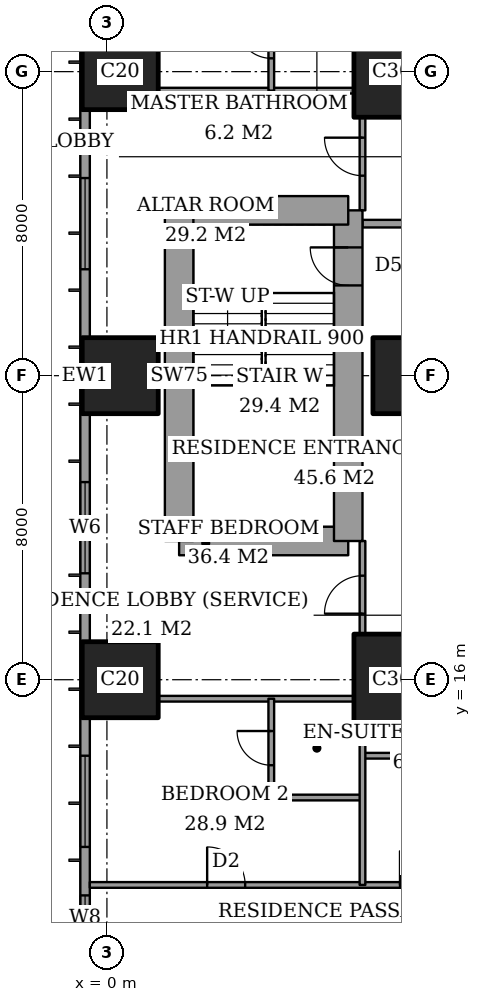
"""IFC4 building model, lengths in metres.
Left out: names, types, materials, properties, quantities, classifications, styles, units other than length and angle.
Written with IfcOpenShell. Run it as: python <this file> out.ifc"""

import sys

from ifc_helpers import new_model, si_unit, direction, frame, frame_2d, origin, origin_2d, place, context, subcontext, project, spatial, rectangle, extrude, element, fill, save


model = new_model("IFC4")
c1 = context("Model", 3, precision=1e-05, world=origin(), true_north=direction((0.0, 1.0)))
c2 = subcontext(c1, "Body", "Model", "MODEL_VIEW")
j1 = project(units=[si_unit("LENGTHUNIT", "METRE"), si_unit("PLANEANGLEUNIT", "RADIAN")], contexts=[c1])
p1 = place(None, origin())
s1 = spatial("IfcSite", under=j1, at=p1, CompositionType="ELEMENT")
p2 = place(p1, origin())
s2 = spatial("IfcBuilding", under=s1, at=p2, CompositionType="ELEMENT")
p3 = place(p2, frame((0.0, 0.0, 62.0)))
s3 = spatial("IfcBuildingStorey", under=s2, at=p3, CompositionType="ELEMENT", Elevation=62.0)
for number, where, z_axis, x_axis in (
    (1, (0.35, 16.0, 0.0), (0.0, 0.0, 1.0), (1.0, 0.0, 0.0)),
    (2, (0.35, 24.0, 0.0), (0.0, 0.0, 1.0), (1.0, 0.0, 0.0)),
    (3, (0.35, 32.0, 0.0), (0.0, 0.0, 1.0), (1.0, 0.0, 0.0)),
):
    element("IfcColumn", number, at=place(p3, frame(where, z_axis=z_axis, x_axis=x_axis)), inside=s3, PredefinedType="COLUMN", context=c2, shape_type="SweptSolid", body=[
        extrude(rectangle(XDim=2.0, YDim=2.0, at=origin_2d()), origin(), (0.0, 0.0, 1.0), 3.6),
    ])
p4 = place(p3, frame((8.0, 16.0, 0.0), z_axis=(0.0, 0.0, 1.0), x_axis=(1.0, 0.0, 0.0)))
e4 = element("IfcColumn", 4, at=p4, inside=s3, PredefinedType="COLUMN", context=c2, shape_type="SweptSolid", body=[
    extrude(rectangle(XDim=3.0, YDim=2.4, at=origin_2d()), origin(), (0.0, 0.0, 1.0), 3.6),
])
p5 = place(p3, frame((8.0, 24.0, 0.0), z_axis=(0.0, 0.0, 1.0), x_axis=(1.0, 0.0, 0.0)))
e5 = element("IfcColumn", 5, at=p5, inside=s3, PredefinedType="COLUMN", context=c2, shape_type="SweptSolid", body=[
    extrude(rectangle(XDim=2.0, YDim=2.0, at=origin_2d()), origin(), (0.0, 0.0, 1.0), 3.6),
])
p6 = place(p3, frame((8.0, 32.0, 0.0), z_axis=(0.0, 0.0, 1.0), x_axis=(1.0, 0.0, 0.0)))
e6 = element("IfcColumn", 6, at=p6, inside=s3, PredefinedType="COLUMN", context=c2, shape_type="SweptSolid", body=[
    extrude(rectangle(XDim=3.0, YDim=2.4, at=origin_2d()), origin(), (0.0, 0.0, 1.0), 3.6),
])
p7 = place(p3, frame((1.9, 19.65, 0.0), z_axis=(0.0, 0.0, 1.0), x_axis=(1.0, 0.0, 0.0)))
e7 = element("IfcWall", 7, at=p7, inside=s3, PredefinedType="SHEAR", context=c2, shape_type="SweptSolid", body=[
    extrude(rectangle(XDim=4.45, YDim=0.75, at=frame_2d((2.225, 0.0))), origin(), (0.0, 0.0, 1.0), 3.6),
])
p8 = place(p3, frame((6.35, 19.65, 0.0), z_axis=(0.0, 0.0, 1.0), x_axis=(0.0, 1.0, 0.0)))
e8 = element("IfcWall", 8, at=p8, inside=s3, PredefinedType="SHEAR", context=c2, shape_type="SweptSolid", body=[
    extrude(rectangle(XDim=8.7, YDim=0.75, at=frame_2d((4.35, 0.0))), origin(), (0.0, 0.0, 1.0), 3.6),
])
p9 = place(p8, frame((6.725, 0.0, 0.0)))
e9 = element("IfcOpeningElement", 9, at=p9, cuts=e8, PredefinedType="OPENING", context=c2, shape_type="SweptSolid", body=[
    extrude(rectangle(XDim=1.0, YDim=2.1, at=frame_2d((0.5, 1.05))), frame((0.0, 0.385, 0.0), z_axis=(0.0, -1.0, 0.0), x_axis=(1.0, 0.0, 0.0)), (0.0, 0.0, 1.0), 0.77),
])
p10 = place(p3, frame((6.35, 28.35, 0.0), z_axis=(0.0, 0.0, 1.0), x_axis=(-1.0, 0.0, 0.0)))
e10 = element("IfcWall", 10, at=p10, inside=s3, PredefinedType="SHEAR", context=c2, shape_type="SweptSolid", body=[
    extrude(rectangle(XDim=4.45, YDim=0.75, at=frame_2d((2.225, 0.0))), origin(), (0.0, 0.0, 1.0), 3.6),
])
p11 = place(p3, frame((1.9, 28.35, 0.0), z_axis=(0.0, 0.0, 1.0), x_axis=(0.0, -1.0, 0.0)))
e11 = element("IfcWall", 11, at=p11, inside=s3, PredefinedType="SHEAR", context=c2, shape_type="SweptSolid", body=[
    extrude(rectangle(XDim=8.7, YDim=0.75, at=frame_2d((4.35, 0.0))), origin(), (0.0, 0.0, 1.0), 3.6),
])
p12 = place(p3, frame((-0.575, 44.825, 0.0), z_axis=(0.0, 0.0, 1.0), x_axis=(0.0, -1.0, 0.0)))
e12 = element("IfcWall", 12, at=p12, inside=s3, PredefinedType="SOLIDWALL", context=c2, shape_type="SweptSolid", body=[
    extrude(rectangle(XDim=41.65, YDim=0.25, at=frame_2d((20.825, 0.0))), origin(), (0.0, 0.0, 1.0), 3.6),
])
p13 = place(p12, frame((0.775, 0.0, 0.6)))
e13 = element("IfcOpeningElement", 13, at=p13, cuts=e12, PredefinedType="OPENING", context=c2, shape_type="SweptSolid", body=[
    extrude(rectangle(XDim=2.4, YDim=2.0, at=frame_2d((1.2, 1.0))), frame((0.0, 0.135, 0.0), z_axis=(0.0, -1.0, 0.0), x_axis=(1.0, 0.0, 0.0)), (0.0, 0.0, 1.0), 0.27),
])
p14 = place(p12, frame((6.1, 0.0, 0.6)))
e14 = element("IfcOpeningElement", 14, at=p14, cuts=e12, PredefinedType="OPENING", context=c2, shape_type="SweptSolid", body=[
    extrude(rectangle(XDim=1.2, YDim=2.0, at=frame_2d((0.6, 1.0))), frame((0.0, 0.135, 0.0), z_axis=(0.0, -1.0, 0.0), x_axis=(1.0, 0.0, 0.0)), (0.0, 0.0, 1.0), 0.27),
])
p15 = place(p12, frame((8.425, 0.0, 0.6)))
e15 = element("IfcOpeningElement", 15, at=p15, cuts=e12, PredefinedType="OPENING", context=c2, shape_type="SweptSolid", body=[
    extrude(rectangle(XDim=2.4, YDim=2.0, at=frame_2d((1.2, 1.0))), frame((0.0, 0.135, 0.0), z_axis=(0.0, -1.0, 0.0), x_axis=(1.0, 0.0, 0.0)), (0.0, 0.0, 1.0), 0.27),
])
p16 = place(p12, frame((15.625, 0.0, 0.6)))
e16 = element("IfcOpeningElement", 16, at=p16, cuts=e12, PredefinedType="OPENING", context=c2, shape_type="SweptSolid", body=[
    extrude(rectangle(XDim=2.4, YDim=2.0, at=frame_2d((1.2, 1.0))), frame((0.0, 0.135, 0.0), z_axis=(0.0, -1.0, 0.0), x_axis=(1.0, 0.0, 0.0)), (0.0, 0.0, 1.0), 0.27),
])
p17 = place(p12, frame((23.625, 0.0, 0.6)))
e17 = element("IfcOpeningElement", 17, at=p17, cuts=e12, PredefinedType="OPENING", context=c2, shape_type="SweptSolid", body=[
    extrude(rectangle(XDim=2.4, YDim=2.0, at=frame_2d((1.2, 1.0))), frame((0.0, 0.135, 0.0), z_axis=(0.0, -1.0, 0.0), x_axis=(1.0, 0.0, 0.0)), (0.0, 0.0, 1.0), 0.27),
])
p18 = place(p12, frame((30.825, 0.0, 0.6)))
e18 = element("IfcOpeningElement", 18, at=p18, cuts=e12, PredefinedType="OPENING", context=c2, shape_type="SweptSolid", body=[
    extrude(rectangle(XDim=2.4, YDim=2.0, at=frame_2d((1.2, 1.0))), frame((0.0, 0.135, 0.0), z_axis=(0.0, -1.0, 0.0), x_axis=(1.0, 0.0, 0.0)), (0.0, 0.0, 1.0), 0.27),
])
p19 = place(p12, frame((34.5, 0.0, 0.6)))
e19 = element("IfcOpeningElement", 19, at=p19, cuts=e12, PredefinedType="OPENING", context=c2, shape_type="SweptSolid", body=[
    extrude(rectangle(XDim=1.2, YDim=2.0, at=frame_2d((0.6, 1.0))), frame((0.0, 0.135, 0.0), z_axis=(0.0, -1.0, 0.0), x_axis=(1.0, 0.0, 0.0)), (0.0, 0.0, 1.0), 0.27),
])
p20 = place(p12, frame((38.475, 0.0, 0.6)))
e20 = element("IfcOpeningElement", 20, at=p20, cuts=e12, PredefinedType="OPENING", context=c2, shape_type="SweptSolid", body=[
    extrude(rectangle(XDim=2.4, YDim=2.0, at=frame_2d((1.2, 1.0))), frame((0.0, 0.135, 0.0), z_axis=(0.0, -1.0, 0.0), x_axis=(1.0, 0.0, 0.0)), (0.0, 0.0, 1.0), 0.27),
])
p21 = place(p3, frame((-0.45, 10.6, 0.0), z_axis=(0.0, 0.0, 1.0), x_axis=(1.0, 0.0, 0.0)))
e21 = element("IfcWall", 21, at=p21, inside=s3, PredefinedType="PARTITIONING", context=c2, shape_type="SweptSolid", body=[
    extrude(rectangle(XDim=25.011, YDim=0.15, at=frame_2d((12.505, 0.0))), origin(), (0.0, 0.0, 1.0), 3.35),
])
p22 = place(p21, frame((10.65, 0.0, 0.0)))
e22 = element("IfcOpeningElement", 22, at=p22, cuts=e21, PredefinedType="OPENING", context=c2, shape_type="SweptSolid", body=[
    extrude(rectangle(XDim=1.0, YDim=2.1, at=frame_2d((0.5, 1.05))), frame((0.0, 0.085, 0.0), z_axis=(0.0, -1.0, 0.0), x_axis=(1.0, 0.0, 0.0)), (0.0, 0.0, 1.0), 0.17),
])
p23 = place(p21, frame((3.087, 0.0, 0.0)))
e23 = element("IfcOpeningElement", 23, at=p23, cuts=e21, PredefinedType="OPENING", context=c2, shape_type="SweptSolid", body=[
    extrude(rectangle(XDim=1.0, YDim=2.1, at=frame_2d((0.5, 1.05))), frame((0.0, 0.085, 0.0), z_axis=(0.0, -1.0, 0.0), x_axis=(1.0, 0.0, 0.0)), (0.0, 0.0, 1.0), 0.17),
])
p24 = place(p21, frame((8.163, 0.0, 0.0)))
e24 = element("IfcOpeningElement", 24, at=p24, cuts=e21, PredefinedType="OPENING", context=c2, shape_type="SweptSolid", body=[
    extrude(rectangle(XDim=0.9, YDim=2.1, at=frame_2d((0.45, 1.05))), frame((0.0, 0.085, 0.0), z_axis=(0.0, -1.0, 0.0), x_axis=(1.0, 0.0, 0.0)), (0.0, 0.0, 1.0), 0.17),
])
p25 = place(p21, frame((13.35, 0.0, 0.0)))
e25 = element("IfcOpeningElement", 25, at=p25, cuts=e21, PredefinedType="OPENING", context=c2, shape_type="SweptSolid", body=[
    extrude(rectangle(XDim=1.0, YDim=2.1, at=frame_2d((0.5, 1.05))), frame((0.0, 0.085, 0.0), z_axis=(0.0, -1.0, 0.0), x_axis=(1.0, 0.0, 0.0)), (0.0, 0.0, 1.0), 0.17),
])
p26 = place(p21, frame((16.45, 0.0, 0.0)))
e26 = element("IfcOpeningElement", 26, at=p26, cuts=e21, PredefinedType="OPENING", context=c2, shape_type="SweptSolid", body=[
    extrude(rectangle(XDim=1.0, YDim=2.1, at=frame_2d((0.5, 1.05))), frame((0.0, 0.085, 0.0), z_axis=(0.0, -1.0, 0.0), x_axis=(1.0, 0.0, 0.0)), (0.0, 0.0, 1.0), 0.17),
])
p27 = place(p21, frame((21.175, 0.0, 0.0)))
e27 = element("IfcOpeningElement", 27, at=p27, cuts=e21, PredefinedType="OPENING", context=c2, shape_type="SweptSolid", body=[
    extrude(rectangle(XDim=1.0, YDim=2.1, at=frame_2d((0.5, 1.05))), frame((0.0, 0.085, 0.0), z_axis=(0.0, -1.0, 0.0), x_axis=(1.0, 0.0, 0.0)), (0.0, 0.0, 1.0), 0.17),
])
p28 = place(p3, frame((4.325, 12.9, 0.0), z_axis=(0.0, 0.0, 1.0), x_axis=(1.0, 0.0, 0.0)))
e28 = element("IfcWall", 28, at=p28, inside=s3, PredefinedType="PARTITIONING", context=c2, shape_type="SweptSolid", body=[
    extrude(rectangle(XDim=2.4, YDim=0.15, at=frame_2d((1.2, 0.0))), origin(), (0.0, 0.0, 1.0), 3.35),
])
p29 = place(p3, frame((6.725, 14.0, 0.0), z_axis=(0.0, 0.0, 1.0), x_axis=(1.0, 0.0, 0.0)))
e29 = element("IfcWall", 29, at=p29, inside=s3, PredefinedType="PARTITIONING", context=c2, shape_type="SweptSolid", body=[
    extrude(rectangle(XDim=2.875, YDim=0.15, at=frame_2d((1.438, 0.0))), origin(), (0.0, 0.0, 1.0), 3.35),
])
p30 = place(p3, frame((1.35, 15.5, 0.0), z_axis=(0.0, 0.0, 1.0), x_axis=(1.0, 0.0, 0.0)))
e30 = element("IfcWall", 30, at=p30, inside=s3, PredefinedType="PARTITIONING", context=c2, shape_type="SweptSolid", body=[
    extrude(rectangle(XDim=5.15, YDim=0.15, at=frame_2d((2.575, 0.0))), origin(), (0.0, 0.0, 1.0), 3.35),
])
p31 = place(p3, frame((6.725, 28.0, 0.0), z_axis=(0.0, 0.0, 1.0), x_axis=(1.0, 0.0, 0.0)))
e31 = element("IfcWall", 31, at=p31, inside=s3, PredefinedType="PARTITIONING", context=c2, shape_type="SweptSolid", body=[
    extrude(rectangle(XDim=17.275, YDim=0.2, at=frame_2d((8.637, 0.0))), origin(), (0.0, 0.0, 1.0), 3.35),
])
p32 = place(p31, frame((6.475, 0.0, 0.0)))
e32 = element("IfcOpeningElement", 32, at=p32, cuts=e31, PredefinedType="OPENING", context=c2, shape_type="SweptSolid", body=[
    extrude(rectangle(XDim=1.2, YDim=2.4, at=frame_2d((0.6, 1.2))), frame((0.0, 0.11, 0.0), z_axis=(0.0, -1.0, 0.0), x_axis=(1.0, 0.0, 0.0)), (0.0, 0.0, 1.0), 0.22),
])
p33 = place(p3, frame((1.35, 31.5, 0.0), z_axis=(0.0, 0.0, 1.0), x_axis=(1.0, 0.0, 0.0)))
e33 = element("IfcWall", 33, at=p33, inside=s3, PredefinedType="PARTITIONING", context=c2, shape_type="SweptSolid", body=[
    extrude(rectangle(XDim=5.15, YDim=0.15, at=frame_2d((2.575, 0.0))), origin(), (0.0, 0.0, 1.0), 3.35),
])
p34 = place(p3, frame((4.325, 12.9, 0.0), z_axis=(0.0, 0.0, 1.0), x_axis=(0.0, 1.0, 0.0)))
e34 = element("IfcWall", 34, at=p34, inside=s3, PredefinedType="PARTITIONING", context=c2, shape_type="SweptSolid", body=[
    extrude(rectangle(XDim=2.6, YDim=0.15, at=frame_2d((1.3, 0.0))), origin(), (0.0, 0.0, 1.0), 3.35),
])
p35 = place(p34, frame((0.85, 0.0, 0.0)))
e35 = element("IfcOpeningElement", 35, at=p35, cuts=e34, PredefinedType="OPENING", context=c2, shape_type="SweptSolid", body=[
    extrude(rectangle(XDim=0.9, YDim=2.1, at=frame_2d((0.45, 1.05))), frame((0.0, 0.085, 0.0), z_axis=(0.0, -1.0, 0.0), x_axis=(1.0, 0.0, 0.0)), (0.0, 0.0, 1.0), 0.17),
])
p36 = place(p3, frame((4.325, 31.5, 0.0), z_axis=(0.0, 0.0, 1.0), x_axis=(0.0, 1.0, 0.0)))
e36 = element("IfcWall", 36, at=p36, inside=s3, PredefinedType="PARTITIONING", context=c2, shape_type="SweptSolid", body=[
    extrude(rectangle(XDim=2.6, YDim=0.15, at=frame_2d((1.3, 0.0))), origin(), (0.0, 0.0, 1.0), 3.35),
])
p37 = place(p36, frame((0.85, 0.0, 0.0)))
e37 = element("IfcOpeningElement", 37, at=p37, cuts=e36, PredefinedType="OPENING", context=c2, shape_type="SweptSolid", body=[
    extrude(rectangle(XDim=0.9, YDim=2.1, at=frame_2d((0.45, 1.05))), frame((0.0, 0.085, 0.0), z_axis=(0.0, -1.0, 0.0), x_axis=(1.0, 0.0, 0.0)), (0.0, 0.0, 1.0), 0.17),
])
p38 = place(p3, frame((6.725, 10.6, 0.0), z_axis=(0.0, 0.0, 1.0), x_axis=(0.0, 1.0, 0.0)))
e38 = element("IfcWall", 38, at=p38, inside=s3, PredefinedType="PARTITIONING", context=c2, shape_type="SweptSolid", body=[
    extrude(rectangle(XDim=4.2, YDim=0.15, at=frame_2d((2.1, 0.0))), origin(), (0.0, 0.0, 1.0), 3.35),
])
p39 = place(p3, frame((6.725, 17.2, 0.0), z_axis=(0.0, 0.0, 1.0), x_axis=(0.0, 1.0, 0.0)))
e39 = element("IfcWall", 39, at=p39, inside=s3, PredefinedType="PARTITIONING", context=c2, shape_type="SweptSolid", body=[
    extrude(rectangle(XDim=2.45, YDim=0.15, at=frame_2d((1.225, 0.0))), origin(), (0.0, 0.0, 1.0), 3.35),
])
p40 = place(p39, frame((0.538, 0.0, 0.0)))
e40 = element("IfcOpeningElement", 40, at=p40, cuts=e39, PredefinedType="OPENING", context=c2, shape_type="SweptSolid", body=[
    extrude(rectangle(XDim=1.0, YDim=2.1, at=frame_2d((0.5, 1.05))), frame((0.0, 0.085, 0.0), z_axis=(0.0, -1.0, 0.0), x_axis=(1.0, 0.0, 0.0)), (0.0, 0.0, 1.0), 0.17),
])
p41 = place(p3, frame((6.725, 28.35, 0.0), z_axis=(0.0, 0.0, 1.0), x_axis=(0.0, 1.0, 0.0)))
e41 = element("IfcWall", 41, at=p41, inside=s3, PredefinedType="PARTITIONING", context=c2, shape_type="SweptSolid", body=[
    extrude(rectangle(XDim=2.45, YDim=0.15, at=frame_2d((1.225, 0.0))), origin(), (0.0, 0.0, 1.0), 3.35),
])
p42 = place(p41, frame((0.913, 0.0, 0.0)))
e42 = element("IfcOpeningElement", 42, at=p42, cuts=e41, PredefinedType="OPENING", context=c2, shape_type="SweptSolid", body=[
    extrude(rectangle(XDim=1.0, YDim=2.1, at=frame_2d((0.5, 1.05))), frame((0.0, 0.085, 0.0), z_axis=(0.0, -1.0, 0.0), x_axis=(1.0, 0.0, 0.0)), (0.0, 0.0, 1.0), 0.17),
])
p43 = place(p16, origin())
e43 = element("IfcWindow", 43, at=p43, inside=s3, PartitioningType="SINGLE_PANEL", PredefinedType="WINDOW", context=c2, shape_type="SweptSolid", body=[
    extrude(rectangle(XDim=2.4, YDim=2.0, at=frame_2d((1.2, 1.0))), frame((0.0, 0.03, 0.0), z_axis=(0.0, -1.0, 0.0), x_axis=(1.0, 0.0, 0.0)), (0.0, 0.0, 1.0), 0.06),
])
fill(e16, e43)
p44 = place(p17, origin())
e44 = element("IfcWindow", 44, at=p44, inside=s3, PartitioningType="SINGLE_PANEL", PredefinedType="WINDOW", context=c2, shape_type="SweptSolid", body=[
    extrude(rectangle(XDim=2.4, YDim=2.0, at=frame_2d((1.2, 1.0))), frame((0.0, 0.03, 0.0), z_axis=(0.0, -1.0, 0.0), x_axis=(1.0, 0.0, 0.0)), (0.0, 0.0, 1.0), 0.06),
])
fill(e17, e44)
p45 = place(p18, origin())
e45 = element("IfcWindow", 45, at=p45, inside=s3, PartitioningType="SINGLE_PANEL", PredefinedType="WINDOW", context=c2, shape_type="SweptSolid", body=[
    extrude(rectangle(XDim=2.4, YDim=2.0, at=frame_2d((1.2, 1.0))), frame((0.0, 0.03, 0.0), z_axis=(0.0, -1.0, 0.0), x_axis=(1.0, 0.0, 0.0)), (0.0, 0.0, 1.0), 0.06),
])
fill(e18, e45)
p46 = place(p19, origin())
e46 = element("IfcWindow", 46, at=p46, inside=s3, PartitioningType="SINGLE_PANEL", PredefinedType="WINDOW", context=c2, shape_type="SweptSolid", body=[
    extrude(rectangle(XDim=1.2, YDim=2.0, at=frame_2d((0.6, 1.0))), frame((0.0, 0.03, 0.0), z_axis=(0.0, -1.0, 0.0), x_axis=(1.0, 0.0, 0.0)), (0.0, 0.0, 1.0), 0.06),
])
fill(e19, e46)
p47 = place(p35, origin())
e47 = element("IfcDoor", 47, at=p47, inside=s3, OperationType="SINGLE_SWING_LEFT", PredefinedType="DOOR", context=c2, shape_type="SweptSolid", body=[
    extrude(rectangle(XDim=0.9, YDim=2.1, at=frame_2d((0.45, 1.05))), frame((0.0, 0.025, 0.0), z_axis=(0.0, -1.0, 0.0), x_axis=(1.0, 0.0, 0.0)), (0.0, 0.0, 1.0), 0.05),
])
fill(e35, e47)
p48 = place(p23, origin())
e48 = element("IfcDoor", 48, at=p48, inside=s3, OperationType="SINGLE_SWING_RIGHT", PredefinedType="DOOR", context=c2, shape_type="SweptSolid", body=[
    extrude(rectangle(XDim=1.0, YDim=2.1, at=frame_2d((0.5, 1.05))), frame((0.0, 0.025, 0.0), z_axis=(0.0, -1.0, 0.0), x_axis=(1.0, 0.0, 0.0)), (0.0, 0.0, 1.0), 0.05),
])
fill(e23, e48)
p49 = place(p40, origin())
e49 = element("IfcDoor", 49, at=p49, inside=s3, OperationType="SINGLE_SWING_RIGHT", PredefinedType="DOOR", context=c2, shape_type="SweptSolid", body=[
    extrude(rectangle(XDim=1.0, YDim=2.1, at=frame_2d((0.5, 1.05))), frame((0.0, 0.025, 0.0), z_axis=(0.0, -1.0, 0.0), x_axis=(1.0, 0.0, 0.0)), (0.0, 0.0, 1.0), 0.05),
])
fill(e40, e49)
p50 = place(p24, origin())
e50 = element("IfcDoor", 50, at=p50, inside=s3, OperationType="SINGLE_SWING_RIGHT", PredefinedType="DOOR", context=c2, shape_type="SweptSolid", body=[
    extrude(rectangle(XDim=0.9, YDim=2.1, at=frame_2d((0.45, 1.05))), frame((0.0, 0.025, 0.0), z_axis=(0.0, -1.0, 0.0), x_axis=(1.0, 0.0, 0.0)), (0.0, 0.0, 1.0), 0.05),
])
fill(e24, e50)
p51 = place(p37, origin())
e51 = element("IfcDoor", 51, at=p51, inside=s3, OperationType="SINGLE_SWING_LEFT", PredefinedType="DOOR", context=c2, shape_type="SweptSolid", body=[
    extrude(rectangle(XDim=0.9, YDim=2.1, at=frame_2d((0.45, 1.05))), frame((0.0, 0.025, 0.0), z_axis=(0.0, -1.0, 0.0), x_axis=(1.0, 0.0, 0.0)), (0.0, 0.0, 1.0), 0.05),
])
fill(e37, e51)
p52 = place(p42, origin())
e52 = element("IfcDoor", 52, at=p52, inside=s3, OperationType="SINGLE_SWING_LEFT", PredefinedType="DOOR", context=c2, shape_type="SweptSolid", body=[
    extrude(rectangle(XDim=1.0, YDim=2.1, at=frame_2d((0.5, 1.05))), frame((0.0, 0.025, 0.0), z_axis=(0.0, -1.0, 0.0), x_axis=(1.0, 0.0, 0.0)), (0.0, 0.0, 1.0), 0.05),
])
fill(e42, e52)
p53 = place(p9, origin())
e53 = element("IfcDoor", 53, at=p53, inside=s3, OperationType="SINGLE_SWING_LEFT", PredefinedType="DOOR", context=c2, shape_type="SweptSolid", body=[
    extrude(rectangle(XDim=1.0, YDim=2.1, at=frame_2d((0.5, 1.05))), frame((0.0, 0.025, 0.0), z_axis=(0.0, -1.0, 0.0), x_axis=(1.0, 0.0, 0.0)), (0.0, 0.0, 1.0), 0.05),
])
fill(e9, e53)
save(model, sys.argv[1])
